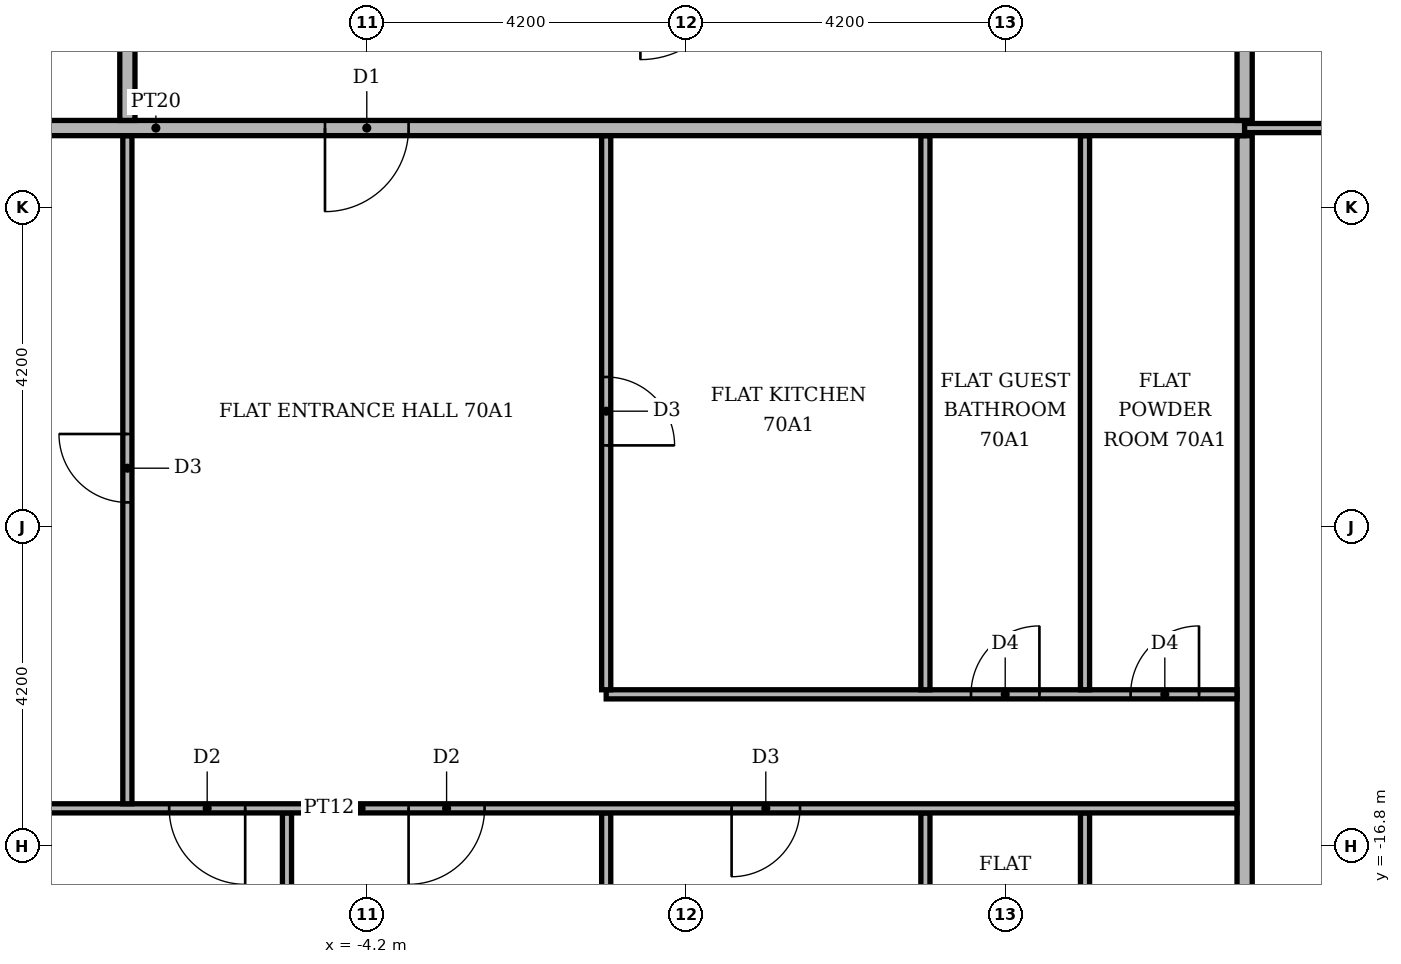
"""IFC4 building model, lengths in metres.
Left out: names, types, materials, properties, quantities, classifications, styles, units other than length and angle.
Written with IfcOpenShell. Run it as: python <this file> out.ifc"""

import sys

from ifc_helpers import new_model, si_unit, direction, frame, frame_2d, origin, place, context, subcontext, project, spatial, rectangle, extrude, element, fill, save


model = new_model("IFC4")
c1 = context("Model", 3, precision=1e-05, world=origin(), true_north=direction((0.0, 1.0)))
c2 = subcontext(c1, "Body", "Model", "MODEL_VIEW")
j1 = project(units=[si_unit("LENGTHUNIT", "METRE"), si_unit("PLANEANGLEUNIT", "RADIAN")], contexts=[c1])
p1 = place(None, origin())
s1 = spatial("IfcSite", under=j1, at=p1, CompositionType="ELEMENT")
p2 = place(p1, origin())
s2 = spatial("IfcBuilding", under=s1, at=p2, CompositionType="ELEMENT")
p3 = place(p2, frame((0.0, 0.0, 292.8)))
s3 = spatial("IfcBuildingStorey", under=s2, at=p3, CompositionType="ELEMENT", Elevation=292.8)
for number, where, z_axis, x_axis in (
    (1, (-5.25, -21.3, 0.0), (0.0, 0.0, 1.0), (0.0, 1.0, 0.0)),
    (2, (-1.05, -21.3, 0.0), (0.0, 0.0, 1.0), (0.0, 1.0, 0.0)),
):
    element("IfcWall", number, at=place(p3, frame(where, z_axis=z_axis, x_axis=x_axis)), inside=s3, PredefinedType="PARTITIONING", context=c2, shape_type="SweptSolid", body=[
        extrude(rectangle(XDim=4.94, YDim=0.12, at=frame_2d((2.47, 0.0))), origin(), (0.0, 0.0, 1.0), 3.55),
    ])
p4 = place(p3, frame((3.15, -21.3, 0.0), z_axis=(0.0, 0.0, 1.0), x_axis=(0.0, 1.0, 0.0)))
e3 = element("IfcWall", 3, at=p4, inside=s3, PredefinedType="PARTITIONING", context=c2, shape_type="SweptSolid", body=[
    extrude(rectangle(XDim=4.94, YDim=0.12, at=frame_2d((2.47, 0.0))), origin(), (0.0, 0.0, 1.0), 3.55),
])
p5 = place(p4, frame((1.9, 0.0, 0.0)))
e4 = element("IfcOpeningElement", 4, at=p5, cuts=e3, PredefinedType="OPENING", context=c2, shape_type="SweptSolid", body=[
    extrude(rectangle(XDim=0.9, YDim=2.1, at=frame_2d((0.45, 1.05))), frame((0.0, 0.07, 0.0), z_axis=(0.0, -1.0, 0.0), x_axis=(1.0, 0.0, 0.0)), (0.0, 0.0, 1.0), 0.14),
])
p6 = place(p3, frame((5.25, -21.3, 0.0), z_axis=(0.0, 0.0, 1.0), x_axis=(0.0, 1.0, 0.0)))
e5 = element("IfcWall", 5, at=p6, inside=s3, PredefinedType="PARTITIONING", context=c2, shape_type="SweptSolid", body=[
    extrude(rectangle(XDim=4.94, YDim=0.12, at=frame_2d((2.47, 0.0))), origin(), (0.0, 0.0, 1.0), 3.55),
])
p7 = place(p6, frame((1.9, 0.0, 0.0)))
e6 = element("IfcOpeningElement", 6, at=p7, cuts=e5, PredefinedType="OPENING", context=c2, shape_type="SweptSolid", body=[
    extrude(rectangle(XDim=0.9, YDim=2.1, at=frame_2d((0.45, 1.05))), frame((0.0, 0.07, 0.0), z_axis=(0.0, -1.0, 0.0), x_axis=(1.0, 0.0, 0.0)), (0.0, 0.0, 1.0), 0.14),
])
p8 = place(p3, frame((7.35, -21.3, 0.0), z_axis=(0.0, 0.0, 1.0), x_axis=(0.0, 1.0, 0.0)))
e7 = element("IfcWall", 7, at=p8, inside=s3, PredefinedType="PARTITIONING", context=c2, shape_type="SweptSolid", body=[
    extrude(rectangle(XDim=13.85, YDim=0.2, at=frame_2d((6.925, 0.0))), origin(), (0.0, 0.0, 1.0), 3.55),
])
p9 = place(p3, frame((-15.8, -16.3, 0.0), z_axis=(0.0, 0.0, 1.0), x_axis=(1.0, 0.0, 0.0)))
e8 = element("IfcWall", 8, at=p9, inside=s3, PredefinedType="PARTITIONING", context=c2, shape_type="SweptSolid", body=[
    extrude(rectangle(XDim=23.05, YDim=0.12, at=frame_2d((11.525, 0.0))), origin(), (0.0, 0.0, 1.0), 3.55),
])
p10 = place(p9, frame((9.0, 0.0, 0.0)))
e9 = element("IfcOpeningElement", 9, at=p10, cuts=e8, PredefinedType="OPENING", context=c2, shape_type="SweptSolid", body=[
    extrude(rectangle(XDim=1.0, YDim=2.1, at=frame_2d((0.5, 1.05))), frame((0.0, 0.07, 0.0), z_axis=(0.0, -1.0, 0.0), x_axis=(1.0, 0.0, 0.0)), (0.0, 0.0, 1.0), 0.14),
])
p11 = place(p9, frame((12.15, 0.0, 0.0)))
e10 = element("IfcOpeningElement", 10, at=p11, cuts=e8, PredefinedType="OPENING", context=c2, shape_type="SweptSolid", body=[
    extrude(rectangle(XDim=1.0, YDim=2.1, at=frame_2d((0.5, 1.05))), frame((0.0, 0.07, 0.0), z_axis=(0.0, -1.0, 0.0), x_axis=(1.0, 0.0, 0.0)), (0.0, 0.0, 1.0), 0.14),
])
p12 = place(p9, frame((16.4, 0.0, 0.0)))
e11 = element("IfcOpeningElement", 11, at=p12, cuts=e8, PredefinedType="OPENING", context=c2, shape_type="SweptSolid", body=[
    extrude(rectangle(XDim=0.9, YDim=2.1, at=frame_2d((0.45, 1.05))), frame((0.0, 0.07, 0.0), z_axis=(0.0, -1.0, 0.0), x_axis=(1.0, 0.0, 0.0)), (0.0, 0.0, 1.0), 0.14),
])
p13 = place(p3, frame((-7.35, -16.24, 0.0), z_axis=(0.0, 0.0, 1.0), x_axis=(0.0, 1.0, 0.0)))
e12 = element("IfcWall", 12, at=p13, inside=s3, PredefinedType="PARTITIONING", context=c2, shape_type="SweptSolid", body=[
    extrude(rectangle(XDim=8.79, YDim=0.12, at=frame_2d((4.395, 0.0))), origin(), (0.0, 0.0, 1.0), 3.55),
])
p14 = place(p13, frame((3.965, 0.0, 0.0)))
e13 = element("IfcOpeningElement", 13, at=p14, cuts=e12, PredefinedType="OPENING", context=c2, shape_type="SweptSolid", body=[
    extrude(rectangle(XDim=0.9, YDim=2.1, at=frame_2d((0.45, 1.05))), frame((0.0, 0.07, 0.0), z_axis=(0.0, -1.0, 0.0), x_axis=(1.0, 0.0, 0.0)), (0.0, 0.0, 1.0), 0.14),
])
p15 = place(p3, frame((-1.05, -14.8, 0.0), z_axis=(0.0, 0.0, 1.0), x_axis=(1.0, 0.0, 0.0)))
e14 = element("IfcWall", 14, at=p15, inside=s3, PredefinedType="PARTITIONING", context=c2, shape_type="SweptSolid", body=[
    extrude(rectangle(XDim=8.3, YDim=0.12, at=frame_2d((4.15, 0.0))), origin(), (0.0, 0.0, 1.0), 3.55),
])
p16 = place(p15, frame((4.8, 0.0, 0.0)))
e15 = element("IfcOpeningElement", 15, at=p16, cuts=e14, PredefinedType="OPENING", context=c2, shape_type="SweptSolid", body=[
    extrude(rectangle(XDim=0.9, YDim=2.1, at=frame_2d((0.45, 1.05))), frame((0.0, 0.07, 0.0), z_axis=(0.0, -1.0, 0.0), x_axis=(1.0, 0.0, 0.0)), (0.0, 0.0, 1.0), 0.14),
])
p17 = place(p15, frame((6.9, 0.0, 0.0)))
e16 = element("IfcOpeningElement", 16, at=p17, cuts=e14, PredefinedType="OPENING", context=c2, shape_type="SweptSolid", body=[
    extrude(rectangle(XDim=0.9, YDim=2.1, at=frame_2d((0.45, 1.05))), frame((0.0, 0.07, 0.0), z_axis=(0.0, -1.0, 0.0), x_axis=(1.0, 0.0, 0.0)), (0.0, 0.0, 1.0), 0.14),
])
p18 = place(p3, frame((-1.05, -14.74, 0.0), z_axis=(0.0, 0.0, 1.0), x_axis=(0.0, 1.0, 0.0)))
e17 = element("IfcWall", 17, at=p18, inside=s3, PredefinedType="PARTITIONING", context=c2, shape_type="SweptSolid", body=[
    extrude(rectangle(XDim=7.29, YDim=0.12, at=frame_2d((3.645, 0.0))), origin(), (0.0, 0.0, 1.0), 3.55),
])
p19 = place(p18, frame((3.215, 0.0, 0.0)))
e18 = element("IfcOpeningElement", 18, at=p19, cuts=e17, PredefinedType="OPENING", context=c2, shape_type="SweptSolid", body=[
    extrude(rectangle(XDim=0.9, YDim=2.1, at=frame_2d((0.45, 1.05))), frame((0.0, 0.07, 0.0), z_axis=(0.0, -1.0, 0.0), x_axis=(1.0, 0.0, 0.0)), (0.0, 0.0, 1.0), 0.14),
])
for number, where, z_axis, x_axis in (
    (19, (3.15, -14.74, 0.0), (0.0, 0.0, 1.0), (0.0, 1.0, 0.0)),
    (20, (5.25, -14.74, 0.0), (0.0, 0.0, 1.0), (0.0, 1.0, 0.0)),
):
    element("IfcWall", number, at=place(p3, frame(where, z_axis=z_axis, x_axis=x_axis)), inside=s3, PredefinedType="PARTITIONING", context=c2, shape_type="SweptSolid", body=[
        extrude(rectangle(XDim=7.29, YDim=0.12, at=frame_2d((3.645, 0.0))), origin(), (0.0, 0.0, 1.0), 3.55),
    ])
p20 = place(p3, frame((-21.3, -7.35, 0.0), z_axis=(0.0, 0.0, 1.0), x_axis=(1.0, 0.0, 0.0)))
e21 = element("IfcWall", 21, at=p20, inside=s3, PredefinedType="PARTITIONING", context=c2, shape_type="SweptSolid", body=[
    extrude(rectangle(XDim=28.65, YDim=0.2, at=frame_2d((14.325, 0.0))), origin(), (0.0, 0.0, 1.0), 3.55),
])
p21 = place(p20, frame((16.55, 0.0, 0.0)))
e22 = element("IfcOpeningElement", 22, at=p21, cuts=e21, PredefinedType="OPENING", context=c2, shape_type="SweptSolid", body=[
    extrude(rectangle(XDim=1.1, YDim=2.4, at=frame_2d((0.55, 1.2))), frame((0.0, 0.11, 0.0), z_axis=(0.0, -1.0, 0.0), x_axis=(1.0, 0.0, 0.0)), (0.0, 0.0, 1.0), 0.22),
])
p22 = place(p3, frame((7.35, -7.35, 0.0), z_axis=(0.0, 0.0, 1.0), x_axis=(1.0, 0.0, 0.0)))
e23 = element("IfcWall", 23, at=p22, inside=s3, PredefinedType="PARTITIONING", context=c2, shape_type="SweptSolid", body=[
    extrude(rectangle(XDim=8.35, YDim=0.12, at=frame_2d((4.175, 0.0))), origin(), (0.0, 0.0, 1.0), 3.55),
])
p23 = place(p22, frame((3.725, 0.0, 0.0)))
e24 = element("IfcOpeningElement", 24, at=p23, cuts=e23, PredefinedType="OPENING", context=c2, shape_type="SweptSolid", body=[
    extrude(rectangle(XDim=0.9, YDim=2.1, at=frame_2d((0.45, 1.05))), frame((0.0, 0.07, 0.0), z_axis=(0.0, -1.0, 0.0), x_axis=(1.0, 0.0, 0.0)), (0.0, 0.0, 1.0), 0.14),
])
p24 = place(p3, frame((-7.35, -7.25, 0.0), z_axis=(0.0, 0.0, 1.0), x_axis=(0.0, 1.0, 0.0)))
e25 = element("IfcWall", 25, at=p24, inside=s3, PredefinedType="PARTITIONING", context=c2, shape_type="SweptSolid", body=[
    extrude(rectangle(XDim=14.5, YDim=0.2, at=frame_2d((7.25, 0.0))), origin(), (0.0, 0.0, 1.0), 3.55),
])
p25 = place(p24, frame((10.9, 0.0, 0.0)))
e26 = element("IfcOpeningElement", 26, at=p25, cuts=e25, PredefinedType="OPENING", context=c2, shape_type="SweptSolid", body=[
    extrude(rectangle(XDim=1.1, YDim=2.4, at=frame_2d((0.55, 1.2))), frame((0.0, 0.11, 0.0), z_axis=(0.0, -1.0, 0.0), x_axis=(1.0, 0.0, 0.0)), (0.0, 0.0, 1.0), 0.22),
])
p26 = place(p3, frame((7.35, -7.25, 0.0), z_axis=(0.0, 0.0, 1.0), x_axis=(0.0, 1.0, 0.0)))
e27 = element("IfcWall", 27, at=p26, inside=s3, PredefinedType="PARTITIONING", context=c2, shape_type="SweptSolid", body=[
    extrude(rectangle(XDim=14.5, YDim=0.2, at=frame_2d((7.25, 0.0))), origin(), (0.0, 0.0, 1.0), 3.55),
])
p27 = place(p26, frame((2.5, 0.0, 0.0)))
e28 = element("IfcOpeningElement", 28, at=p27, cuts=e27, PredefinedType="OPENING", context=c2, shape_type="SweptSolid", body=[
    extrude(rectangle(XDim=1.1, YDim=2.4, at=frame_2d((0.55, 1.2))), frame((0.0, 0.11, 0.0), z_axis=(0.0, -1.0, 0.0), x_axis=(1.0, 0.0, 0.0)), (0.0, 0.0, 1.0), 0.22),
])
p28 = place(p21, frame((1.1, 0.0, 0.0), z_axis=(0.0, 0.0, 1.0), x_axis=(-1.0, 0.0, 0.0)))
e29 = element("IfcDoor", 29, at=p28, inside=s3, OperationType="SINGLE_SWING_LEFT", PredefinedType="DOOR", context=c2, shape_type="SweptSolid", body=[
    extrude(rectangle(XDim=1.1, YDim=2.4, at=frame_2d((0.55, 1.2))), frame((0.0, 0.025, 0.0), z_axis=(0.0, -1.0, 0.0), x_axis=(1.0, 0.0, 0.0)), (0.0, 0.0, 1.0), 0.05),
])
fill(e22, e29)
p29 = place(p14, origin())
e30 = element("IfcDoor", 30, at=p29, inside=s3, OperationType="SINGLE_SWING_RIGHT", PredefinedType="DOOR", context=c2, shape_type="SweptSolid", body=[
    extrude(rectangle(XDim=0.9, YDim=2.1, at=frame_2d((0.45, 1.05))), frame((0.0, 0.025, 0.0), z_axis=(0.0, -1.0, 0.0), x_axis=(1.0, 0.0, 0.0)), (0.0, 0.0, 1.0), 0.05),
])
fill(e13, e30)
p30 = place(p19, frame((0.9, 0.0, 0.0), z_axis=(0.0, 0.0, 1.0), x_axis=(-1.0, 0.0, 0.0)))
e31 = element("IfcDoor", 31, at=p30, inside=s3, OperationType="SINGLE_SWING_LEFT", PredefinedType="DOOR", context=c2, shape_type="SweptSolid", body=[
    extrude(rectangle(XDim=0.9, YDim=2.1, at=frame_2d((0.45, 1.05))), frame((0.0, 0.025, 0.0), z_axis=(0.0, -1.0, 0.0), x_axis=(1.0, 0.0, 0.0)), (0.0, 0.0, 1.0), 0.05),
])
fill(e18, e31)
p31 = place(p16, origin())
e32 = element("IfcDoor", 32, at=p31, inside=s3, OperationType="SINGLE_SWING_RIGHT", PredefinedType="DOOR", context=c2, shape_type="SweptSolid", body=[
    extrude(rectangle(XDim=0.9, YDim=2.1, at=frame_2d((0.45, 1.05))), frame((0.0, 0.025, 0.0), z_axis=(0.0, -1.0, 0.0), x_axis=(1.0, 0.0, 0.0)), (0.0, 0.0, 1.0), 0.05),
])
fill(e15, e32)
p32 = place(p17, origin())
e33 = element("IfcDoor", 33, at=p32, inside=s3, OperationType="SINGLE_SWING_RIGHT", PredefinedType="DOOR", context=c2, shape_type="SweptSolid", body=[
    extrude(rectangle(XDim=0.9, YDim=2.1, at=frame_2d((0.45, 1.05))), frame((0.0, 0.025, 0.0), z_axis=(0.0, -1.0, 0.0), x_axis=(1.0, 0.0, 0.0)), (0.0, 0.0, 1.0), 0.05),
])
fill(e16, e33)
p33 = place(p10, frame((1.0, 0.0, 0.0), z_axis=(0.0, 0.0, 1.0), x_axis=(-1.0, 0.0, 0.0)))
e34 = element("IfcDoor", 34, at=p33, inside=s3, OperationType="SINGLE_SWING_RIGHT", PredefinedType="DOOR", context=c2, shape_type="SweptSolid", body=[
    extrude(rectangle(XDim=1.0, YDim=2.1, at=frame_2d((0.5, 1.05))), frame((0.0, 0.025, 0.0), z_axis=(0.0, -1.0, 0.0), x_axis=(1.0, 0.0, 0.0)), (0.0, 0.0, 1.0), 0.05),
])
fill(e9, e34)
p34 = place(p11, frame((1.0, 0.0, 0.0), z_axis=(0.0, 0.0, 1.0), x_axis=(-1.0, 0.0, 0.0)))
e35 = element("IfcDoor", 35, at=p34, inside=s3, OperationType="SINGLE_SWING_LEFT", PredefinedType="DOOR", context=c2, shape_type="SweptSolid", body=[
    extrude(rectangle(XDim=1.0, YDim=2.1, at=frame_2d((0.5, 1.05))), frame((0.0, 0.025, 0.0), z_axis=(0.0, -1.0, 0.0), x_axis=(1.0, 0.0, 0.0)), (0.0, 0.0, 1.0), 0.05),
])
fill(e10, e35)
p35 = place(p12, frame((0.9, 0.0, 0.0), z_axis=(0.0, 0.0, 1.0), x_axis=(-1.0, 0.0, 0.0)))
e36 = element("IfcDoor", 36, at=p35, inside=s3, OperationType="SINGLE_SWING_LEFT", PredefinedType="DOOR", context=c2, shape_type="SweptSolid", body=[
    extrude(rectangle(XDim=0.9, YDim=2.1, at=frame_2d((0.45, 1.05))), frame((0.0, 0.025, 0.0), z_axis=(0.0, -1.0, 0.0), x_axis=(1.0, 0.0, 0.0)), (0.0, 0.0, 1.0), 0.05),
])
fill(e11, e36)
save(model, sys.argv[1])
